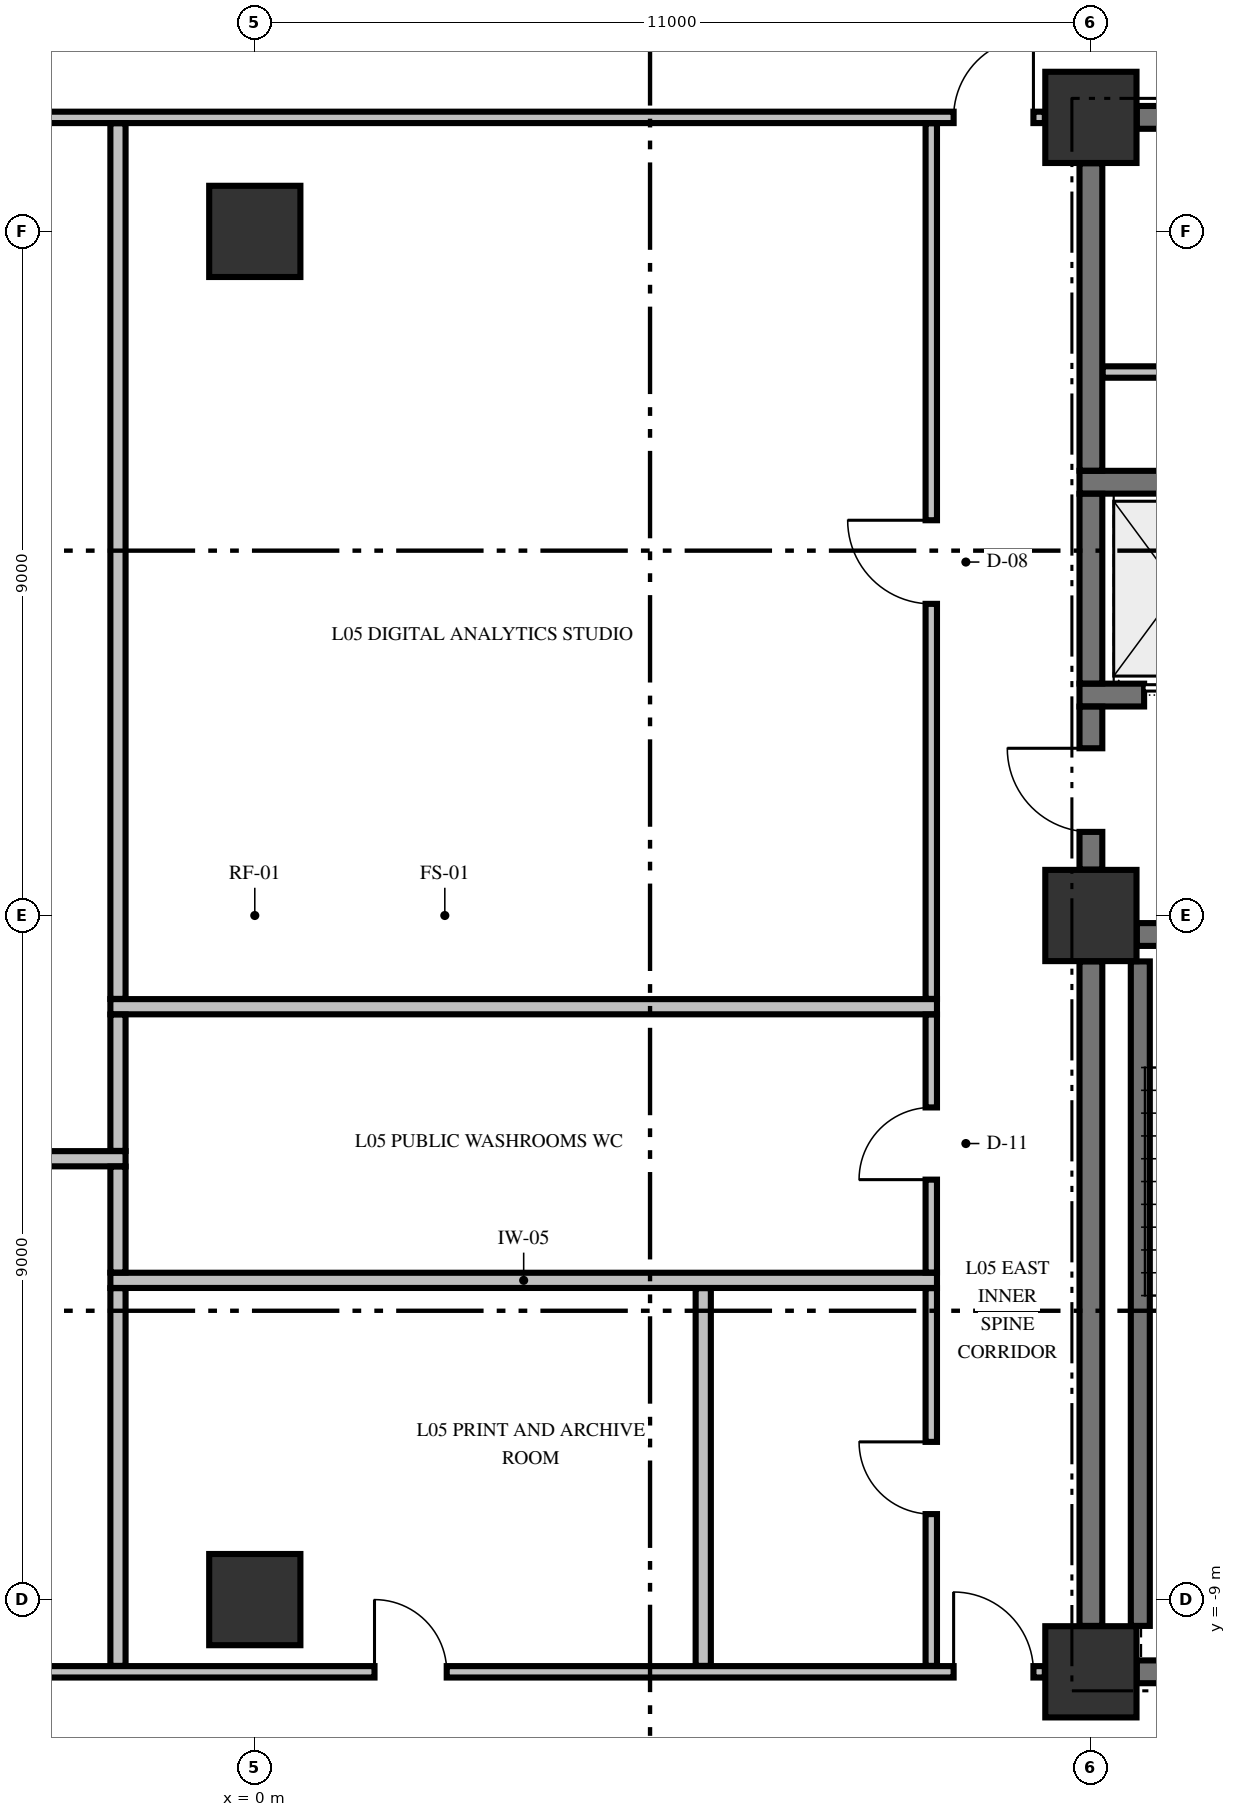
"""IFC4 building model, lengths in metres.
Left out: names, types, materials, properties, quantities, classifications, styles, units other than length and angle.
Written with IfcOpenShell. Run it as: python <this file> out.ifc"""

import sys

from ifc_helpers import new_model, si_unit, direction, frame, frame_2d, origin, origin_2d, place, context, subcontext, project, spatial, rectangle, extrude, element, fill, save


model = new_model("IFC4")
c1 = context("Model", 3, precision=1e-05, world=origin(), true_north=direction((0.0, 1.0)))
c2 = subcontext(c1, "Body", "Model", "MODEL_VIEW")
j1 = project(units=[si_unit("LENGTHUNIT", "METRE"), si_unit("PLANEANGLEUNIT", "RADIAN")], contexts=[c1])
p1 = place(None, origin())
s1 = spatial("IfcSite", under=j1, at=p1, CompositionType="ELEMENT")
p2 = place(p1, origin())
s2 = spatial("IfcBuilding", under=s1, at=p2, CompositionType="ELEMENT")
p3 = place(p2, frame((0.0, 0.0, 27.2)))
s3 = spatial("IfcBuildingStorey", under=s2, at=p3, CompositionType="ELEMENT", Elevation=27.2)
for number, where, z_axis, x_axis in (
    (1, (11.0, -9.95, -0.45), (0.0, 0.0, 1.0), (1.0, 0.0, 0.0)),
    (2, (11.0, 0.0, -0.45), (0.0, 0.0, 1.0), (1.0, 0.0, 0.0)),
    (3, (11.0, 10.5, -0.45), (0.0, 0.0, 1.0), (1.0, 0.0, 0.0)),
    (4, (0.0, -9.0, -0.45), (0.0, 0.0, 1.0), (1.0, 0.0, 0.0)),
    (5, (0.0, 9.0, -0.45), (0.0, 0.0, 1.0), (1.0, 0.0, 0.0)),
):
    element("IfcColumn", number, at=place(p3, frame(where, z_axis=z_axis, x_axis=x_axis)), inside=s3, PredefinedType="COLUMN", context=c2, shape_type="SweptSolid", body=[
        extrude(rectangle(XDim=1.2, YDim=1.2, at=origin_2d()), origin(), (0.0, 0.0, 1.0), 3.77),
    ])
p4 = place(p3, frame((11.604, -9.95, 0.0), z_axis=(0.0, 0.0, 1.0), x_axis=(1.0, 0.0, 0.0)))
e6 = element("IfcWall", 6, at=p4, inside=s3, PredefinedType="SHEAR", context=c2, shape_type="SweptSolid", body=[
    extrude(rectangle(XDim=3.096, YDim=0.3, at=frame_2d((1.548, 0.0))), origin(), (0.0, 0.0, 1.0), 3.32),
])
p5 = place(p3, frame((11.604, -0.25, 0.0), z_axis=(0.0, 0.0, 1.0), x_axis=(1.0, 0.0, 0.0)))
e7 = element("IfcWall", 7, at=p5, inside=s3, PredefinedType="SHEAR", context=c2, shape_type="SweptSolid", body=[
    extrude(rectangle(XDim=3.271, YDim=0.3, at=frame_2d((1.635, 0.0))), origin(), (0.0, 0.0, 1.0), 3.32),
])
p6 = place(p5, frame((0.996, 0.0, 0.0)))
e8 = element("IfcOpeningElement", 8, at=p6, cuts=e7, PredefinedType="OPENING", context=c2, shape_type="SweptSolid", body=[
    extrude(rectangle(XDim=1.1, YDim=2.15, at=frame_2d((0.55, 1.075))), frame((0.0, 0.16, 0.0), z_axis=(0.0, -1.0, 0.0), x_axis=(1.0, 0.0, 0.0)), (0.0, 0.0, 1.0), 0.32),
])
p7 = place(p3, frame((10.85, 2.9, 0.0), z_axis=(0.0, 0.0, 1.0), x_axis=(1.0, 0.0, 0.0)))
e9 = element("IfcWall", 9, at=p7, inside=s3, PredefinedType="SHEAR", context=c2, shape_type="SweptSolid", body=[
    extrude(rectangle(XDim=4.025, YDim=0.3, at=frame_2d((2.012, 0.0))), origin(), (0.0, 0.0, 1.0), 3.32),
])
p8 = place(p7, frame((0.85, 0.0, 0.0)))
e10 = element("IfcOpeningElement", 10, at=p8, cuts=e9, PredefinedType="OPENING", context=c2, shape_type="SweptSolid", body=[
    extrude(rectangle(XDim=1.1, YDim=2.2, at=frame_2d((0.55, 1.1))), frame((0.0, 0.16, 0.0), z_axis=(0.0, -1.0, 0.0), x_axis=(1.0, 0.0, 0.0)), (0.0, 0.0, 1.0), 0.32),
])
p9 = place(p3, frame((10.85, 5.7, 0.0), z_axis=(0.0, 0.0, 1.0), x_axis=(1.0, 0.0, 0.0)))
e11 = element("IfcWall", 11, at=p9, inside=s3, PredefinedType="SHEAR", context=c2, shape_type="SweptSolid", body=[
    extrude(rectangle(XDim=4.025, YDim=0.3, at=frame_2d((2.012, 0.0))), origin(), (0.0, 0.0, 1.0), 3.32),
])
p10 = place(p3, frame((11.604, 10.5, 0.0), z_axis=(0.0, 0.0, 1.0), x_axis=(1.0, 0.0, 0.0)))
e12 = element("IfcWall", 12, at=p10, inside=s3, PredefinedType="SHEAR", context=c2, shape_type="SweptSolid", body=[
    extrude(rectangle(XDim=3.096, YDim=0.3, at=frame_2d((1.548, 0.0))), origin(), (0.0, 0.0, 1.0), 3.32),
])
p11 = place(p10, frame((1.841, 0.0, 0.0)))
e13 = element("IfcOpeningElement", 13, at=p11, cuts=e12, PredefinedType="OPENING", context=c2, shape_type="SweptSolid", body=[
    extrude(rectangle(XDim=0.95, YDim=2.15, at=frame_2d((0.475, 1.075))), frame((0.0, 0.16, 0.0), z_axis=(0.0, -1.0, 0.0), x_axis=(1.0, 0.0, 0.0)), (0.0, 0.0, 1.0), 0.32),
])
p12 = place(p3, frame((-10.394, -9.95, 0.0), z_axis=(0.0, 0.0, 1.0), x_axis=(1.0, 0.0, 0.0)))
e14 = element("IfcWall", 14, at=p12, inside=s3, PredefinedType="PARTITIONING", context=c2, shape_type="SweptSolid", body=[
    extrude(rectangle(XDim=20.788, YDim=0.15, at=frame_2d((10.394, 0.0))), origin(), (0.0, 0.0, 1.0), 3.32),
])
p13 = place(p12, frame((0.15, 0.0, 0.0)))
e15 = element("IfcOpeningElement", 15, at=p13, cuts=e14, PredefinedType="OPENING", context=c2, shape_type="SweptSolid", body=[
    extrude(rectangle(XDim=1.05, YDim=2.15, at=frame_2d((0.525, 1.075))), frame((0.0, 0.085, 0.0), z_axis=(0.0, -1.0, 0.0), x_axis=(1.0, 0.0, 0.0)), (0.0, 0.0, 1.0), 0.17),
])
p14 = place(p12, frame((19.588, 0.0, 0.0)))
e16 = element("IfcOpeningElement", 16, at=p14, cuts=e14, PredefinedType="OPENING", context=c2, shape_type="SweptSolid", body=[
    extrude(rectangle(XDim=1.05, YDim=2.15, at=frame_2d((0.525, 1.075))), frame((0.0, 0.085, 0.0), z_axis=(0.0, -1.0, 0.0), x_axis=(1.0, 0.0, 0.0)), (0.0, 0.0, 1.0), 0.17),
])
p15 = place(p12, frame((11.969, 0.0, 0.0)))
e17 = element("IfcOpeningElement", 17, at=p15, cuts=e14, PredefinedType="OPENING", context=c2, shape_type="SweptSolid", body=[
    extrude(rectangle(XDim=0.95, YDim=2.15, at=frame_2d((0.475, 1.075))), frame((0.0, 0.085, 0.0), z_axis=(0.0, -1.0, 0.0), x_axis=(1.0, 0.0, 0.0)), (0.0, 0.0, 1.0), 0.17),
])
p16 = place(p3, frame((-1.9, -4.8, 0.0), z_axis=(0.0, 0.0, 1.0), x_axis=(1.0, 0.0, 0.0)))
e18 = element("IfcWall", 18, at=p16, inside=s3, PredefinedType="PARTITIONING", context=c2, shape_type="SweptSolid", body=[
    extrude(rectangle(XDim=10.875, YDim=0.2, at=frame_2d((5.438, 0.0))), origin(), (0.0, 0.0, 1.0), 3.32),
])
p17 = place(p3, frame((-8.975, -3.2, 0.0), z_axis=(0.0, 0.0, 1.0), x_axis=(1.0, 0.0, 0.0)))
e19 = element("IfcWall", 19, at=p17, inside=s3, PredefinedType="PARTITIONING", context=c2, shape_type="SweptSolid", body=[
    extrude(rectangle(XDim=7.275, YDim=0.2, at=frame_2d((3.638, 0.0))), origin(), (0.0, 0.0, 1.0), 3.32),
])
p18 = place(p3, frame((-1.9, -1.2, 0.0), z_axis=(0.0, 0.0, 1.0), x_axis=(1.0, 0.0, 0.0)))
e20 = element("IfcWall", 20, at=p18, inside=s3, PredefinedType="PARTITIONING", context=c2, shape_type="SweptSolid", body=[
    extrude(rectangle(XDim=10.875, YDim=0.2, at=frame_2d((5.438, 0.0))), origin(), (0.0, 0.0, 1.0), 3.32),
])
p19 = place(p3, frame((11.153, 7.15, 0.0), z_axis=(0.0, 0.0, 1.0), x_axis=(1.0, 0.0, 0.0)))
e21 = element("IfcWall", 21, at=p19, inside=s3, PredefinedType="PARTITIONING", context=c2, shape_type="SweptSolid", body=[
    extrude(rectangle(XDim=2.072, YDim=0.15, at=frame_2d((1.036, 0.0))), origin(), (0.0, 0.0, 1.0), 3.32),
])
p20 = place(p3, frame((-10.394, 10.5, 0.0), z_axis=(0.0, 0.0, 1.0), x_axis=(1.0, 0.0, 0.0)))
e22 = element("IfcWall", 22, at=p20, inside=s3, PredefinedType="PARTITIONING", context=c2, shape_type="SweptSolid", body=[
    extrude(rectangle(XDim=20.788, YDim=0.15, at=frame_2d((10.394, 0.0))), origin(), (0.0, 0.0, 1.0), 3.32),
])
p21 = place(p20, frame((0.15, 0.0, 0.0)))
e23 = element("IfcOpeningElement", 23, at=p21, cuts=e22, PredefinedType="OPENING", context=c2, shape_type="SweptSolid", body=[
    extrude(rectangle(XDim=1.05, YDim=2.15, at=frame_2d((0.525, 1.075))), frame((0.0, 0.085, 0.0), z_axis=(0.0, -1.0, 0.0), x_axis=(1.0, 0.0, 0.0)), (0.0, 0.0, 1.0), 0.17),
])
p22 = place(p20, frame((19.588, 0.0, 0.0)))
e24 = element("IfcOpeningElement", 24, at=p22, cuts=e22, PredefinedType="OPENING", context=c2, shape_type="SweptSolid", body=[
    extrude(rectangle(XDim=1.05, YDim=2.15, at=frame_2d((0.525, 1.075))), frame((0.0, 0.085, 0.0), z_axis=(0.0, -1.0, 0.0), x_axis=(1.0, 0.0, 0.0)), (0.0, 0.0, 1.0), 0.17),
])
p23 = place(p3, frame((11.0, -9.346, 0.0), z_axis=(0.0, 0.0, 1.0), x_axis=(0.0, 1.0, 0.0)))
e25 = element("IfcWall", 25, at=p23, inside=s3, PredefinedType="SHEAR", context=c2, shape_type="SweptSolid", body=[
    extrude(rectangle(XDim=8.742, YDim=0.3, at=frame_2d((4.371, 0.0))), origin(), (0.0, 0.0, 1.0), 3.32),
])
p24 = place(p3, frame((11.0, 0.604, 0.0), z_axis=(0.0, 0.0, 1.0), x_axis=(0.0, 1.0, 0.0)))
e26 = element("IfcWall", 26, at=p24, inside=s3, PredefinedType="SHEAR", context=c2, shape_type="SweptSolid", body=[
    extrude(rectangle(XDim=2.144, YDim=0.3, at=frame_2d((1.072, 0.0))), origin(), (0.0, 0.0, 1.0), 3.32),
])
p25 = place(p24, frame((0.496, 0.0, 0.0)))
e27 = element("IfcOpeningElement", 27, at=p25, cuts=e26, PredefinedType="OPENING", context=c2, shape_type="SweptSolid", body=[
    extrude(rectangle(XDim=1.1, YDim=2.15, at=frame_2d((0.55, 1.075))), frame((0.0, 0.16, 0.0), z_axis=(0.0, -1.0, 0.0), x_axis=(1.0, 0.0, 0.0)), (0.0, 0.0, 1.0), 0.32),
])
p26 = place(p3, frame((11.0, 3.052, 0.0), z_axis=(0.0, 0.0, 1.0), x_axis=(0.0, 1.0, 0.0)))
e28 = element("IfcWall", 28, at=p26, inside=s3, PredefinedType="SHEAR", context=c2, shape_type="SweptSolid", body=[
    extrude(rectangle(XDim=2.496, YDim=0.3, at=frame_2d((1.248, 0.0))), origin(), (0.0, 0.0, 1.0), 3.32),
])
p27 = place(p3, frame((11.0, 5.852, 0.0), z_axis=(0.0, 0.0, 1.0), x_axis=(0.0, 1.0, 0.0)))
e29 = element("IfcWall", 29, at=p27, inside=s3, PredefinedType="SHEAR", context=c2, shape_type="SweptSolid", body=[
    extrude(rectangle(XDim=4.044, YDim=0.3, at=frame_2d((2.022, 0.0))), origin(), (0.0, 0.0, 1.0), 3.32),
])
p28 = place(p3, frame((11.65, -9.346, 0.0), z_axis=(0.0, 0.0, 1.0), x_axis=(0.0, 1.0, 0.0)))
e30 = element("IfcWall", 30, at=p28, inside=s3, PredefinedType="SOLIDWALL", context=c2, shape_type="SweptSolid", body=[
    extrude(rectangle(XDim=8.742, YDim=0.25, at=frame_2d((4.371, 0.0))), origin(), (0.0, 0.0, 1.0), 3.32),
])
p29 = place(p3, frame((-1.8, -9.872, 0.0), z_axis=(0.0, 0.0, 1.0), x_axis=(0.0, 1.0, 0.0)))
e31 = element("IfcWall", 31, at=p29, inside=s3, PredefinedType="PARTITIONING", context=c2, shape_type="SweptSolid", body=[
    extrude(rectangle(XDim=4.969, YDim=0.2, at=frame_2d((2.484, 0.0))), origin(), (0.0, 0.0, 1.0), 3.32),
])
p30 = place(p3, frame((-1.8, -4.697, 0.0), z_axis=(0.0, 0.0, 1.0), x_axis=(0.0, 1.0, 0.0)))
e32 = element("IfcWall", 32, at=p30, inside=s3, PredefinedType="PARTITIONING", context=c2, shape_type="SweptSolid", body=[
    extrude(rectangle(XDim=1.394, YDim=0.2, at=frame_2d((0.697, 0.0))), origin(), (0.0, 0.0, 1.0), 3.32),
])
p31 = place(p3, frame((-1.8, -3.097, 0.0), z_axis=(0.0, 0.0, 1.0), x_axis=(0.0, 1.0, 0.0)))
e33 = element("IfcWall", 33, at=p31, inside=s3, PredefinedType="PARTITIONING", context=c2, shape_type="SweptSolid", body=[
    extrude(rectangle(XDim=1.794, YDim=0.2, at=frame_2d((0.897, 0.0))), origin(), (0.0, 0.0, 1.0), 3.32),
])
p32 = place(p3, frame((-1.8, -1.097, 0.0), z_axis=(0.0, 0.0, 1.0), x_axis=(0.0, 1.0, 0.0)))
e34 = element("IfcWall", 34, at=p32, inside=s3, PredefinedType="PARTITIONING", context=c2, shape_type="SweptSolid", body=[
    extrude(rectangle(XDim=11.519, YDim=0.2, at=frame_2d((5.76, 0.0))), origin(), (0.0, 0.0, 1.0), 3.32),
])
p33 = place(p3, frame((5.9, -9.872, 0.0), z_axis=(0.0, 0.0, 1.0), x_axis=(0.0, 1.0, 0.0)))
e35 = element("IfcWall", 35, at=p33, inside=s3, PredefinedType="PARTITIONING", context=c2, shape_type="SweptSolid", body=[
    extrude(rectangle(XDim=4.969, YDim=0.2, at=frame_2d((2.484, 0.0))), origin(), (0.0, 0.0, 1.0), 3.32),
])
p34 = place(p3, frame((8.9, -9.872, 0.0), z_axis=(0.0, 0.0, 1.0), x_axis=(0.0, 1.0, 0.0)))
e36 = element("IfcWall", 36, at=p34, inside=s3, PredefinedType="PARTITIONING", context=c2, shape_type="SweptSolid", body=[
    extrude(rectangle(XDim=4.969, YDim=0.15, at=frame_2d((2.484, 0.0))), origin(), (0.0, 0.0, 1.0), 3.32),
])
p35 = place(p34, frame((1.997, 0.0, 0.0)))
e37 = element("IfcOpeningElement", 37, at=p35, cuts=e36, PredefinedType="OPENING", context=c2, shape_type="SweptSolid", body=[
    extrude(rectangle(XDim=0.95, YDim=2.15, at=frame_2d((0.475, 1.075))), frame((0.0, 0.085, 0.0), z_axis=(0.0, -1.0, 0.0), x_axis=(1.0, 0.0, 0.0)), (0.0, 0.0, 1.0), 0.17),
])
p36 = place(p3, frame((8.9, -4.697, 0.0), z_axis=(0.0, 0.0, 1.0), x_axis=(0.0, 1.0, 0.0)))
e38 = element("IfcWall", 38, at=p36, inside=s3, PredefinedType="PARTITIONING", context=c2, shape_type="SweptSolid", body=[
    extrude(rectangle(XDim=3.394, YDim=0.15, at=frame_2d((1.697, 0.0))), origin(), (0.0, 0.0, 1.0), 3.32),
])
p37 = place(p36, frame((1.222, 0.0, 0.0)))
e39 = element("IfcOpeningElement", 39, at=p37, cuts=e38, PredefinedType="OPENING", context=c2, shape_type="SweptSolid", body=[
    extrude(rectangle(XDim=0.95, YDim=2.15, at=frame_2d((0.475, 1.075))), frame((0.0, 0.085, 0.0), z_axis=(0.0, -1.0, 0.0), x_axis=(1.0, 0.0, 0.0)), (0.0, 0.0, 1.0), 0.17),
])
p38 = place(p3, frame((8.9, -1.097, 0.0), z_axis=(0.0, 0.0, 1.0), x_axis=(0.0, 1.0, 0.0)))
e40 = element("IfcWall", 40, at=p38, inside=s3, PredefinedType="PARTITIONING", context=c2, shape_type="SweptSolid", body=[
    extrude(rectangle(XDim=11.519, YDim=0.15, at=frame_2d((5.76, 0.0))), origin(), (0.0, 0.0, 1.0), 3.32),
])
p39 = place(p38, frame((5.197, 0.0, 0.0)))
e41 = element("IfcOpeningElement", 41, at=p39, cuts=e40, PredefinedType="OPENING", context=c2, shape_type="SweptSolid", body=[
    extrude(rectangle(XDim=1.1, YDim=2.15, at=frame_2d((0.55, 1.075))), frame((0.0, 0.085, 0.0), z_axis=(0.0, -1.0, 0.0), x_axis=(1.0, 0.0, 0.0)), (0.0, 0.0, 1.0), 0.17),
])
p40 = place(p25, origin())
e42 = element("IfcDoor", 42, at=p40, inside=s3, OperationType="SINGLE_SWING_RIGHT", PredefinedType="DOOR", context=c2, shape_type="SweptSolid", body=[
    extrude(rectangle(XDim=1.1, YDim=2.15, at=frame_2d((0.55, 1.075))), frame((0.0, 0.025, 0.0), z_axis=(0.0, -1.0, 0.0), x_axis=(1.0, 0.0, 0.0)), (0.0, 0.0, 1.0), 0.05),
])
fill(e27, e42)
p41 = place(p8, origin())
e43 = element("IfcDoor", 43, at=p41, inside=s3, OperationType="SLIDING_TO_RIGHT", PredefinedType="DOOR", context=c2, shape_type="SweptSolid", body=[
    extrude(rectangle(XDim=1.1, YDim=2.2, at=frame_2d((0.55, 1.1))), frame((0.0, 0.025, 0.0), z_axis=(0.0, -1.0, 0.0), x_axis=(1.0, 0.0, 0.0)), (0.0, 0.0, 1.0), 0.05),
])
fill(e10, e43)
p42 = place(p22, origin())
e44 = element("IfcDoor", 44, at=p42, inside=s3, OperationType="SINGLE_SWING_RIGHT", PredefinedType="DOOR", context=c2, shape_type="SweptSolid", body=[
    extrude(rectangle(XDim=1.05, YDim=2.15, at=frame_2d((0.525, 1.075))), frame((0.0, 0.025, 0.0), z_axis=(0.0, -1.0, 0.0), x_axis=(1.0, 0.0, 0.0)), (0.0, 0.0, 1.0), 0.05),
])
fill(e24, e44)
p43 = place(p14, origin())
e45 = element("IfcDoor", 45, at=p43, inside=s3, OperationType="SINGLE_SWING_LEFT", PredefinedType="DOOR", context=c2, shape_type="SweptSolid", body=[
    extrude(rectangle(XDim=1.05, YDim=2.15, at=frame_2d((0.525, 1.075))), frame((0.0, 0.025, 0.0), z_axis=(0.0, -1.0, 0.0), x_axis=(1.0, 0.0, 0.0)), (0.0, 0.0, 1.0), 0.05),
])
fill(e16, e45)
p44 = place(p39, origin())
e46 = element("IfcDoor", 46, at=p44, inside=s3, OperationType="SINGLE_SWING_RIGHT", PredefinedType="DOOR", context=c2, shape_type="SweptSolid", body=[
    extrude(rectangle(XDim=1.1, YDim=2.15, at=frame_2d((0.55, 1.075))), frame((0.0, 0.025, 0.0), z_axis=(0.0, -1.0, 0.0), x_axis=(1.0, 0.0, 0.0)), (0.0, 0.0, 1.0), 0.05),
])
fill(e41, e46)
p45 = place(p37, origin())
e47 = element("IfcDoor", 47, at=p45, inside=s3, OperationType="SINGLE_SWING_LEFT", PredefinedType="DOOR", context=c2, shape_type="SweptSolid", body=[
    extrude(rectangle(XDim=0.95, YDim=2.15, at=frame_2d((0.475, 1.075))), frame((0.0, 0.025, 0.0), z_axis=(0.0, -1.0, 0.0), x_axis=(1.0, 0.0, 0.0)), (0.0, 0.0, 1.0), 0.05),
])
fill(e39, e47)
p46 = place(p35, origin())
e48 = element("IfcDoor", 48, at=p46, inside=s3, OperationType="SINGLE_SWING_RIGHT", PredefinedType="DOOR", context=c2, shape_type="SweptSolid", body=[
    extrude(rectangle(XDim=0.95, YDim=2.15, at=frame_2d((0.475, 1.075))), frame((0.0, 0.025, 0.0), z_axis=(0.0, -1.0, 0.0), x_axis=(1.0, 0.0, 0.0)), (0.0, 0.0, 1.0), 0.05),
])
fill(e37, e48)
p47 = place(p15, origin())
e49 = element("IfcDoor", 49, at=p47, inside=s3, OperationType="SINGLE_SWING_LEFT", PredefinedType="DOOR", context=c2, shape_type="SweptSolid", body=[
    extrude(rectangle(XDim=0.95, YDim=2.15, at=frame_2d((0.475, 1.075))), frame((0.0, 0.025, 0.0), z_axis=(0.0, -1.0, 0.0), x_axis=(1.0, 0.0, 0.0)), (0.0, 0.0, 1.0), 0.05),
])
fill(e17, e49)
save(model, sys.argv[1])
